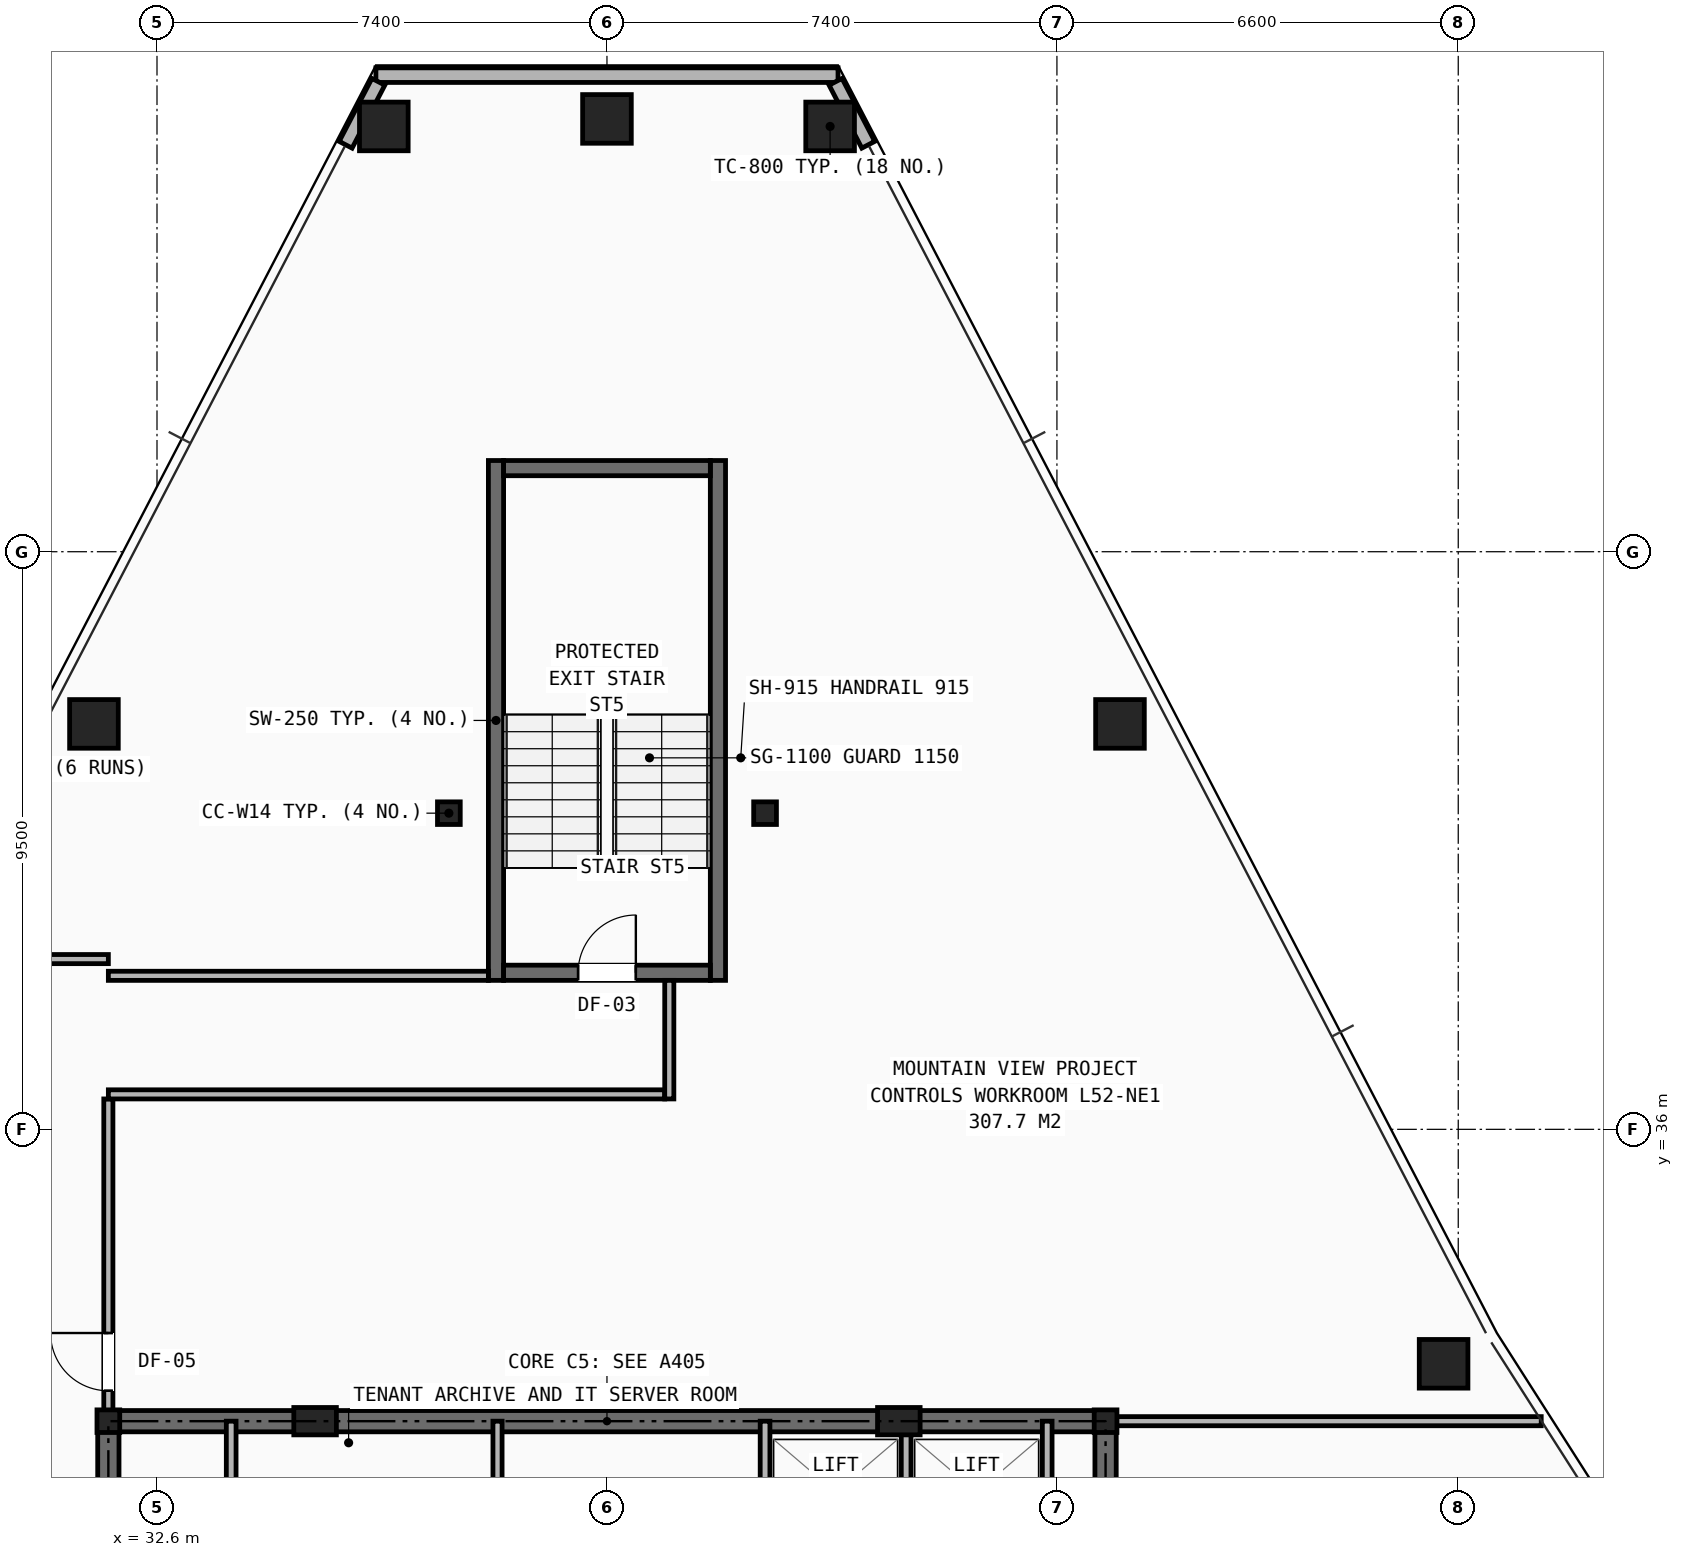
"""IFC4 building model, lengths in metres.
Left out: names, types, materials, properties, quantities, classifications, styles, units other than length and angle.
Written with IfcOpenShell. Run it as: python <this file> out.ifc"""

import sys

from ifc_helpers import new_model, si_unit, direction, frame, frame_2d, origin, origin_2d, place, context, subcontext, project, spatial, rectangle, hollow_rectangle, i_section, extrude, element, fill, save


model = new_model("IFC4")
c1 = context("Model", 3, precision=1e-05, world=origin(), true_north=direction((0.0, 1.0)))
c2 = subcontext(c1, "Body", "Model", "MODEL_VIEW")
j1 = project(units=[si_unit("LENGTHUNIT", "METRE"), si_unit("PLANEANGLEUNIT", "RADIAN")], contexts=[c1])
p1 = place(None, origin())
s1 = spatial("IfcSite", under=j1, at=p1, CompositionType="ELEMENT")
p2 = place(p1, origin())
s2 = spatial("IfcBuilding", under=s1, at=p2, CompositionType="ELEMENT")
p3 = place(p2, frame((0.0, 0.0, 182.7)))
s3 = spatial("IfcBuildingStorey", under=s2, at=p3, CompositionType="ELEMENT", Elevation=182.7)
for number, where, z_axis, x_axis in (
    (1, (31.8, 31.2, 0.0), (0.0, 0.0, 1.0), (1.0, 0.0, 0.0)),
    (2, (48.2, 31.2, 0.0), (0.0, 0.0, 1.0), (1.0, 0.0, 0.0)),
    (3, (37.4, 41.2, 0.0), (0.0, 0.0, 1.0), (1.0, 0.0, 0.0)),
    (4, (42.6, 41.2, 0.0), (0.0, 0.0, 1.0), (1.0, 0.0, 0.0)),
):
    element("IfcColumn", number, at=place(p3, frame(where, z_axis=z_axis, x_axis=x_axis)), inside=s3, PredefinedType="COLUMN", context=c2, shape_type="SweptSolid", body=[
        extrude(i_section(OverallWidth=0.374, OverallDepth=0.372, WebThickness=0.016, FlangeThickness=0.026, at=origin_2d()), origin(), (0.0, 0.0, 1.0), 3.45),
    ])
for number, where, z_axis, x_axis in (
    (5, (35.2, 31.2, 0.0), (0.0, 0.0, 1.0), (1.0, 0.0, 0.0)),
    (6, (44.8, 31.2, 0.0), (0.0, 0.0, 1.0), (1.0, 0.0, 0.0)),
):
    element("IfcColumn", number, at=place(p3, frame(where, z_axis=z_axis, x_axis=x_axis)), inside=s3, PredefinedType="PILASTER", context=c2, shape_type="SweptSolid", body=[
        extrude(rectangle(XDim=0.7, YDim=0.45, at=origin_2d()), origin(), (0.0, 0.0, 1.0), 3.45),
    ])
for number, where, z_axis, x_axis in (
    (7, (43.67, 52.495, 0.0), (0.0, 0.0, 1.0), (1.0, 0.0, 0.0)),
    (8, (40.0, 52.618, 0.0), (0.0, 0.0, 1.0), (1.0, 0.0, 0.0)),
    (9, (36.33, 52.495, 0.0), (0.0, 0.0, 1.0), (1.0, 0.0, 0.0)),
    (10, (31.563, 42.668, 0.0), (0.0, 0.0, 1.0), (1.0, 0.0, 0.0)),
    (11, (53.759, 32.144, 0.0), (0.0, 0.0, 1.0), (1.0, 0.0, 0.0)),
    (12, (48.437, 42.668, 0.0), (0.0, 0.0, 1.0), (1.0, 0.0, 0.0)),
):
    element("IfcColumn", number, at=place(p3, frame(where, z_axis=z_axis, x_axis=x_axis)), inside=s3, PredefinedType="COLUMN", context=c2, shape_type="SweptSolid", body=[
        extrude(hollow_rectangle(XDim=0.8, YDim=0.8, WallThickness=0.055, at=origin_2d()), origin(), (0.0, 0.0, 1.0), 3.45),
    ])
p4 = place(p3, frame((36.2, 53.338, 0.0), z_axis=(0.0, 0.0, 1.0), x_axis=(1.0, 0.0, 0.0)))
e13 = element("IfcWall", 13, at=p4, inside=s3, PredefinedType="SHEAR", context=c2, shape_type="SweptSolid", body=[
    extrude(rectangle(XDim=7.6, YDim=0.24, at=frame_2d((3.8, 0.0))), origin(), (0.0, 0.0, 1.0), 2.583),
])
for number, where, z_axis, x_axis in (
    (14, (36.24, 53.229, 0.0), (0.0, 0.0, 1.0), (-0.461, -0.887, 0.0)),
    (15, (44.298, 52.193, 0.0), (0.0, 0.0, 1.0), (-0.461, 0.887, 0.0)),
):
    element("IfcWall", number, at=place(p3, frame(where, z_axis=z_axis, x_axis=x_axis)), inside=s3, PredefinedType="SHEAR", context=c2, shape_type="SweptSolid", body=[
        extrude(rectangle(XDim=1.168, YDim=0.24, at=frame_2d((0.584, 0.0))), origin(), (0.0, 0.0, 1.0), 2.583),
    ])
p5 = place(p3, frame((31.8, 31.2, 0.0), z_axis=(0.0, 0.0, 1.0), x_axis=(1.0, 0.0, 0.0)))
e16 = element("IfcWall", 16, at=p5, inside=s3, PredefinedType="SHEAR", context=c2, shape_type="SweptSolid", body=[
    extrude(rectangle(XDim=16.4, YDim=0.35, at=frame_2d((8.2, 0.0))), origin(), (0.0, 0.0, 1.0), 3.21),
])
p6 = place(p3, frame((31.8, 16.4, 0.0), z_axis=(0.0, 0.0, 1.0), x_axis=(0.0, 1.0, 0.0)))
e17 = element("IfcWall", 17, at=p6, inside=s3, PredefinedType="SHEAR", context=c2, shape_type="SweptSolid", body=[
    extrude(rectangle(XDim=14.8, YDim=0.35, at=frame_2d((7.4, 0.0))), origin(), (0.0, 0.0, 1.0), 3.21),
])
p7 = place(p6, frame((11.0, 0.0, 0.0)))
e18 = element("IfcOpeningElement", 18, at=p7, cuts=e17, PredefinedType="OPENING", context=c2, shape_type="SweptSolid", body=[
    extrude(rectangle(XDim=1.1, YDim=2.15, at=frame_2d((0.55, 1.075))), frame((0.0, 0.185, 0.0), z_axis=(0.0, -1.0, 0.0), x_axis=(1.0, 0.0, 0.0)), (0.0, 0.0, 1.0), 0.37),
])
p8 = place(p3, frame((48.2, 16.4, 0.0), z_axis=(0.0, 0.0, 1.0), x_axis=(0.0, 1.0, 0.0)))
e19 = element("IfcWall", 19, at=p8, inside=s3, PredefinedType="SHEAR", context=c2, shape_type="SweptSolid", body=[
    extrude(rectangle(XDim=14.8, YDim=0.35, at=frame_2d((7.4, 0.0))), origin(), (0.0, 0.0, 1.0), 3.21),
])
p9 = place(p8, frame((11.0, 0.0, 0.0)))
e20 = element("IfcOpeningElement", 20, at=p9, cuts=e19, PredefinedType="OPENING", context=c2, shape_type="SweptSolid", body=[
    extrude(rectangle(XDim=1.1, YDim=2.15, at=frame_2d((0.55, 1.075))), frame((0.0, 0.185, 0.0), z_axis=(0.0, -1.0, 0.0), x_axis=(1.0, 0.0, 0.0)), (0.0, 0.0, 1.0), 0.37),
])
p10 = place(p3, frame((33.82, 29.02, 0.0), z_axis=(0.0, 0.0, 1.0), x_axis=(0.0, 1.0, 0.0)))
e21 = element("IfcWall", 21, at=p10, inside=s3, PredefinedType="SOLIDWALL", context=c2, shape_type="SweptSolid", body=[
    extrude(rectangle(XDim=2.18, YDim=0.16, at=frame_2d((1.09, 0.0))), origin(), (0.0, 0.0, 1.0), 2.665),
])
p11 = place(p3, frame((38.2, 29.02, 0.0), z_axis=(0.0, 0.0, 1.0), x_axis=(0.0, 1.0, 0.0)))
e22 = element("IfcWall", 22, at=p11, inside=s3, PredefinedType="PARTITIONING", context=c2, shape_type="SweptSolid", body=[
    extrude(rectangle(XDim=2.18, YDim=0.15, at=frame_2d((1.09, 0.0))), origin(), (0.0, 0.0, 1.0), 2.665),
])
for number, where, z_axis, x_axis in (
    (23, (42.6, 29.02, 0.0), (0.0, 0.0, 1.0), (0.0, 1.0, 0.0)),
    (24, (44.92, 29.02, 0.0), (0.0, 0.0, 1.0), (0.0, 1.0, 0.0)),
    (25, (47.24, 29.02, 0.0), (0.0, 0.0, 1.0), (0.0, 1.0, 0.0)),
):
    element("IfcWall", number, at=place(p3, frame(where, z_axis=z_axis, x_axis=x_axis)), inside=s3, PredefinedType="SOLIDWALL", context=c2, shape_type="SweptSolid", body=[
        extrude(rectangle(XDim=2.18, YDim=0.16, at=frame_2d((1.09, 0.0))), origin(), (0.0, 0.0, 1.0), 2.665),
    ])
p12 = place(p3, frame((31.8, 31.2, 0.0), z_axis=(0.0, 0.0, 1.0), x_axis=(0.0, 1.0, 0.0)))
e26 = element("IfcWall", 26, at=p12, inside=s3, PredefinedType="PARTITIONING", context=c2, shape_type="SweptSolid", body=[
    extrude(rectangle(XDim=5.3, YDim=0.15, at=frame_2d((2.65, 0.0))), origin(), (0.0, 0.0, 1.0), 2.252),
])
p13 = place(p12, frame((0.5, 0.0, 0.0)))
e27 = element("IfcOpeningElement", 27, at=p13, cuts=e26, PredefinedType="OPENING", context=c2, shape_type="SweptSolid", body=[
    extrude(rectangle(XDim=0.95, YDim=2.1, at=frame_2d((0.475, 1.05))), frame((0.0, 0.085, 0.0), z_axis=(0.0, -1.0, 0.0), x_axis=(1.0, 0.0, 0.0)), (0.0, 0.0, 1.0), 0.17),
])
p14 = place(p3, frame((29.6, 38.8, 0.0), z_axis=(0.0, 0.0, 1.0), x_axis=(1.0, 0.0, 0.0)))
e28 = element("IfcWall", 28, at=p14, inside=s3, PredefinedType="PARTITIONING", context=c2, shape_type="SweptSolid", body=[
    extrude(rectangle(XDim=2.2, YDim=0.15, at=frame_2d((1.1, 0.0))), origin(), (0.0, 0.0, 1.0), 2.589),
])
p15 = place(p3, frame((48.2, 31.2, 0.0), z_axis=(0.0, 0.0, 1.0), x_axis=(1.0, 0.0, 0.0)))
e29 = element("IfcWall", 29, at=p15, inside=s3, PredefinedType="PARTITIONING", context=c2, shape_type="SweptSolid", body=[
    extrude(rectangle(XDim=7.165, YDim=0.15, at=frame_2d((3.582, 0.0))), origin(), (0.0, 0.0, 1.0), 2.252),
])
for number, where, z_axis, x_axis in (
    (30, (38.175, 38.45, 0.0), (0.0, 0.0, 1.0), (0.0, 1.0, 0.0)),
    (31, (41.825, 38.45, 0.0), (0.0, 0.0, 1.0), (0.0, 1.0, 0.0)),
):
    element("IfcWall", number, at=place(p3, frame(where, z_axis=z_axis, x_axis=x_axis)), inside=s3, PredefinedType="SHEAR", context=c2, shape_type="SweptSolid", body=[
        extrude(rectangle(XDim=8.55, YDim=0.25, at=frame_2d((4.275, 0.0))), origin(), (0.0, 0.0, 1.0), 3.21),
    ])
p16 = place(p3, frame((38.3, 38.575, 0.0), z_axis=(0.0, 0.0, 1.0), x_axis=(1.0, 0.0, 0.0)))
e32 = element("IfcWall", 32, at=p16, inside=s3, PredefinedType="SHEAR", context=c2, shape_type="SweptSolid", body=[
    extrude(rectangle(XDim=3.4, YDim=0.25, at=frame_2d((1.7, 0.0))), origin(), (0.0, 0.0, 1.0), 3.21),
])
p17 = place(p16, frame((1.225, 0.0, 0.0)))
e33 = element("IfcOpeningElement", 33, at=p17, cuts=e32, PredefinedType="OPENING", context=c2, shape_type="SweptSolid", body=[
    extrude(rectangle(XDim=0.95, YDim=2.1, at=frame_2d((0.475, 1.05))), frame((0.0, 0.135, 0.0), z_axis=(0.0, -1.0, 0.0), x_axis=(1.0, 0.0, 0.0)), (0.0, 0.0, 1.0), 0.27),
])
p18 = place(p3, frame((38.3, 46.875, 0.0), z_axis=(0.0, 0.0, 1.0), x_axis=(1.0, 0.0, 0.0)))
e34 = element("IfcWall", 34, at=p18, inside=s3, PredefinedType="SHEAR", context=c2, shape_type="SweptSolid", body=[
    extrude(rectangle(XDim=3.4, YDim=0.25, at=frame_2d((1.7, 0.0))), origin(), (0.0, 0.0, 1.0), 3.21),
])
p19 = place(p3, frame((31.8, 36.575, 0.0), z_axis=(0.0, 0.0, 1.0), x_axis=(1.0, 0.0, 0.0)))
e35 = element("IfcWall", 35, at=p19, inside=s3, PredefinedType="PARTITIONING", context=c2, shape_type="SweptSolid", body=[
    extrude(rectangle(XDim=9.15, YDim=0.15, at=frame_2d((4.575, 0.0))), origin(), (0.0, 0.0, 1.0), 3.21),
])
p20 = place(p3, frame((31.8, 38.525, 0.0), z_axis=(0.0, 0.0, 1.0), x_axis=(1.0, 0.0, 0.0)))
e36 = element("IfcWall", 36, at=p20, inside=s3, PredefinedType="PARTITIONING", context=c2, shape_type="SweptSolid", body=[
    extrude(rectangle(XDim=6.25, YDim=0.15, at=frame_2d((3.125, 0.0))), origin(), (0.0, 0.0, 1.0), 2.793),
])
p21 = place(p3, frame((41.025, 36.5, 0.0), z_axis=(0.0, 0.0, 1.0), x_axis=(0.0, 1.0, 0.0)))
e37 = element("IfcWall", 37, at=p21, inside=s3, PredefinedType="PARTITIONING", context=c2, shape_type="SweptSolid", body=[
    extrude(rectangle(XDim=1.95, YDim=0.15, at=frame_2d((0.975, 0.0))), origin(), (0.0, 0.0, 1.0), 3.21),
])
p22 = place(p13, origin())
e38 = element("IfcDoor", 38, at=p22, inside=s3, OperationType="SINGLE_SWING_RIGHT", PredefinedType="DOOR", context=c2, shape_type="SweptSolid", body=[
    extrude(rectangle(XDim=0.95, YDim=2.1, at=frame_2d((0.475, 1.05))), frame((0.0, 0.025, 0.0), z_axis=(0.0, -1.0, 0.0), x_axis=(1.0, 0.0, 0.0)), (0.0, 0.0, 1.0), 0.05),
])
fill(e27, e38)
p23 = place(p17, origin())
e39 = element("IfcDoor", 39, at=p23, inside=s3, OperationType="SINGLE_SWING_RIGHT", PredefinedType="DOOR", context=c2, shape_type="SweptSolid", body=[
    extrude(rectangle(XDim=0.95, YDim=2.1, at=frame_2d((0.475, 1.05))), frame((0.0, 0.025, 0.0), z_axis=(0.0, -1.0, 0.0), x_axis=(1.0, 0.0, 0.0)), (0.0, 0.0, 1.0), 0.05),
])
fill(e33, e39)
save(model, sys.argv[1])
